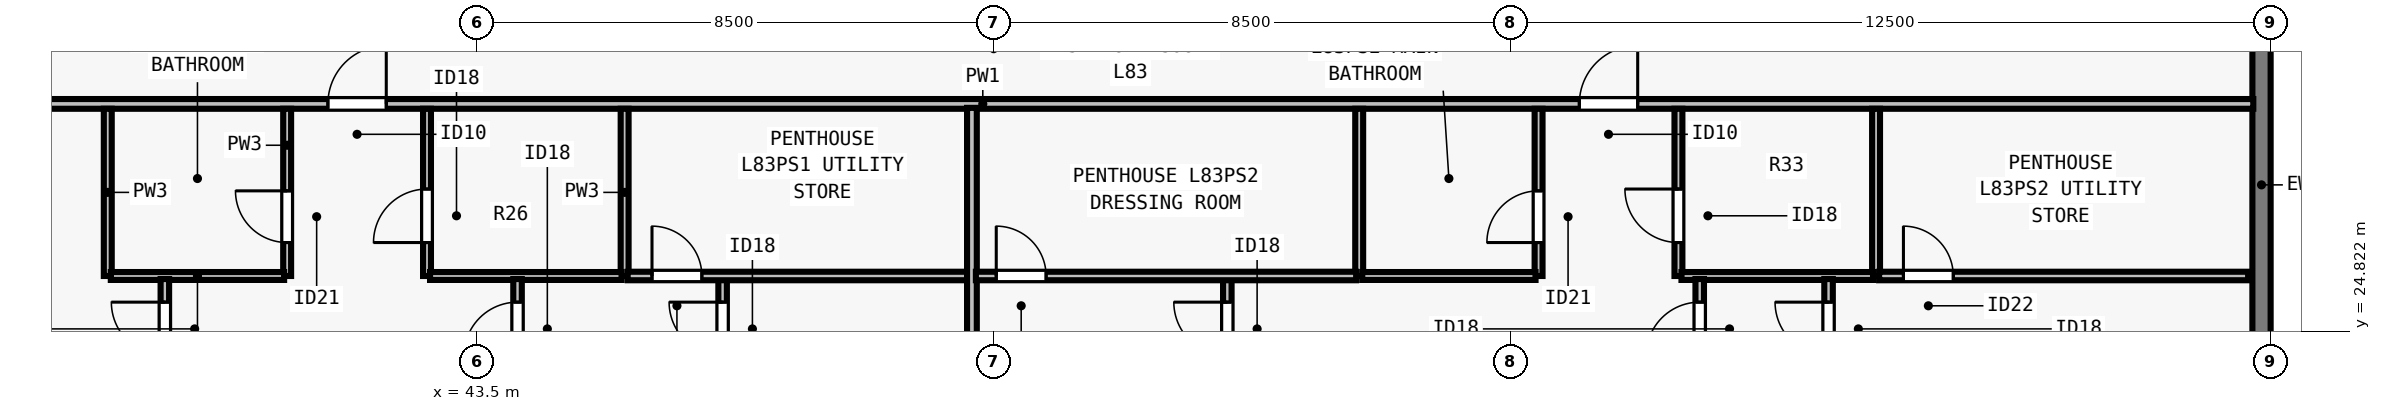
"""IFC4 building model, lengths in metres.
Left out: names, types, materials, properties, quantities, classifications, styles, units other than length and angle.
Written with IfcOpenShell. Run it as: python <this file> out.ifc"""

import sys

from ifc_helpers import new_model, si_unit, direction, frame, frame_2d, origin, place, context, subcontext, project, spatial, rectangle, extrude, element, fill, save


model = new_model("IFC4")
c1 = context("Model", 3, precision=1e-05, world=origin(), true_north=direction((0.0, 1.0)))
c2 = subcontext(c1, "Body", "Model", "MODEL_VIEW")
j1 = project(units=[si_unit("LENGTHUNIT", "METRE"), si_unit("PLANEANGLEUNIT", "RADIAN")], contexts=[c1])
p1 = place(None, origin())
s1 = spatial("IfcSite", under=j1, at=p1, CompositionType="ELEMENT")
p2 = place(p1, origin())
s2 = spatial("IfcBuilding", under=s1, at=p2, CompositionType="ELEMENT")
p3 = place(p2, frame((0.0, 0.0, 301.5)))
s3 = spatial("IfcBuildingStorey", under=s2, at=p3, CompositionType="ELEMENT", Elevation=301.5)
p4 = place(p3, frame((72.85, 34.8, 0.0), z_axis=(0.0, 0.0, 1.0), x_axis=(0.0, -1.0, 0.0)))
e1 = element("IfcWall", 1, at=p4, inside=s3, PredefinedType="SOLIDWALL", context=c2, shape_type="SweptSolid", body=[
    extrude(rectangle(XDim=11.022, YDim=0.3, at=frame_2d((5.511, 0.0))), origin(), (0.0, 0.0, 1.0), 3.29),
])
p5 = place(p4, frame((1.961, 0.0, 0.8)))
e2 = element("IfcOpeningElement", 2, at=p5, cuts=e1, PredefinedType="OPENING", context=c2, shape_type="SweptSolid", body=[
    extrude(rectangle(XDim=2.0, YDim=1.758, at=frame_2d((1.0, 0.879))), frame((0.0, 0.16, 0.0), z_axis=(0.0, -1.0, 0.0), x_axis=(1.0, 0.0, 0.0)), (0.0, 0.0, 1.0), 0.32),
])
p6 = place(p3, frame((31.285, 28.565, 0.0), z_axis=(0.0, 0.0, 1.0), x_axis=(1.0, 0.0, 0.0)))
e3 = element("IfcWall", 3, at=p6, inside=s3, PredefinedType="PARTITIONING", context=c2, shape_type="SweptSolid", body=[
    extrude(rectangle(XDim=41.43, YDim=0.16, at=frame_2d((20.715, 0.0))), origin(), (0.0, 0.0, 1.0), 3.009),
])
p7 = place(p6, frame((9.766, 0.0, 0.0)))
e4 = element("IfcOpeningElement", 4, at=p7, cuts=e3, PredefinedType="OPENING", context=c2, shape_type="SweptSolid", body=[
    extrude(rectangle(XDim=0.96, YDim=2.18, at=frame_2d((0.48, 1.09))), frame((0.0, 0.09, 0.0), z_axis=(0.0, -1.0, 0.0), x_axis=(1.0, 0.0, 0.0)), (0.0, 0.0, 1.0), 0.18),
])
p8 = place(p6, frame((30.346, 0.0, 0.0)))
e5 = element("IfcOpeningElement", 5, at=p8, cuts=e3, PredefinedType="OPENING", context=c2, shape_type="SweptSolid", body=[
    extrude(rectangle(XDim=0.96, YDim=2.18, at=frame_2d((0.48, 1.09))), frame((0.0, 0.09, 0.0), z_axis=(0.0, -1.0, 0.0), x_axis=(1.0, 0.0, 0.0)), (0.0, 0.0, 1.0), 0.18),
])
p9 = place(p3, frame((37.431, 25.735, 0.0), z_axis=(0.0, 0.0, 1.0), x_axis=(0.0, 1.0, 0.0)))
e6 = element("IfcWall", 6, at=p9, inside=s3, PredefinedType="PLUMBINGWALL", context=c2, shape_type="SweptSolid", body=[
    extrude(rectangle(XDim=2.75, YDim=0.13, at=frame_2d((1.375, 0.0))), origin(), (0.0, 0.0, 1.0), 3.29),
])
p10 = place(p3, frame((40.381, 25.735, 0.0), z_axis=(0.0, 0.0, 1.0), x_axis=(0.0, 1.0, 0.0)))
e7 = element("IfcWall", 7, at=p10, inside=s3, PredefinedType="PLUMBINGWALL", context=c2, shape_type="SweptSolid", body=[
    extrude(rectangle(XDim=2.75, YDim=0.13, at=frame_2d((1.375, 0.0))), origin(), (0.0, 0.0, 1.0), 3.29),
])
p11 = place(p10, frame((0.55, 0.0, 0.0)))
e8 = element("IfcOpeningElement", 8, at=p11, cuts=e7, PredefinedType="OPENING", context=c2, shape_type="SweptSolid", body=[
    extrude(rectangle(XDim=0.85, YDim=2.08, at=frame_2d((0.425, 1.04))), frame((0.0, 0.075, 0.0), z_axis=(0.0, -1.0, 0.0), x_axis=(1.0, 0.0, 0.0)), (0.0, 0.0, 1.0), 0.15),
])
p12 = place(p3, frame((37.481, 25.735, 0.0), z_axis=(0.0, 0.0, 1.0), x_axis=(1.0, 0.0, 0.0)))
e9 = element("IfcWall", 9, at=p12, inside=s3, PredefinedType="PLUMBINGWALL", context=c2, shape_type="SweptSolid", body=[
    extrude(rectangle(XDim=2.85, YDim=0.13, at=frame_2d((1.425, 0.0))), origin(), (0.0, 0.0, 1.0), 3.29),
])
p13 = place(p3, frame((45.931, 25.735, 0.0), z_axis=(0.0, 0.0, 1.0), x_axis=(0.0, 1.0, 0.0)))
e10 = element("IfcWall", 10, at=p13, inside=s3, PredefinedType="PLUMBINGWALL", context=c2, shape_type="SweptSolid", body=[
    extrude(rectangle(XDim=2.75, YDim=0.13, at=frame_2d((1.375, 0.0))), origin(), (0.0, 0.0, 1.0), 3.29),
])
p14 = place(p3, frame((42.681, 25.735, 0.0), z_axis=(0.0, 0.0, 1.0), x_axis=(0.0, 1.0, 0.0)))
e11 = element("IfcWall", 11, at=p14, inside=s3, PredefinedType="PLUMBINGWALL", context=c2, shape_type="SweptSolid", body=[
    extrude(rectangle(XDim=2.75, YDim=0.13, at=frame_2d((1.375, 0.0))), origin(), (0.0, 0.0, 1.0), 3.29),
])
p15 = place(p14, frame((0.55, 0.0, 0.0)))
e12 = element("IfcOpeningElement", 12, at=p15, cuts=e11, PredefinedType="OPENING", context=c2, shape_type="SweptSolid", body=[
    extrude(rectangle(XDim=0.88, YDim=2.1, at=frame_2d((0.44, 1.05))), frame((0.0, 0.075, 0.0), z_axis=(0.0, -1.0, 0.0), x_axis=(1.0, 0.0, 0.0)), (0.0, 0.0, 1.0), 0.15),
])
p16 = place(p3, frame((42.731, 25.735, 0.0), z_axis=(0.0, 0.0, 1.0), x_axis=(1.0, 0.0, 0.0)))
e13 = element("IfcWall", 13, at=p16, inside=s3, PredefinedType="PLUMBINGWALL", context=c2, shape_type="SweptSolid", body=[
    extrude(rectangle(XDim=3.15, YDim=0.13, at=frame_2d((1.575, 0.0))), origin(), (0.0, 0.0, 1.0), 3.29),
])
p17 = place(p3, frame((38.37, 18.38, 0.0), z_axis=(0.0, 0.0, 1.0), x_axis=(0.0, 1.0, 0.0)))
e14 = element("IfcWall", 14, at=p17, inside=s3, PredefinedType="PARTITIONING", context=c2, shape_type="SweptSolid", body=[
    extrude(rectangle(XDim=7.305, YDim=0.14, at=frame_2d((3.653, 0.0))), origin(), (0.0, 0.0, 1.0), 2.653),
])
p18 = place(p17, frame((6.045, 0.0, 0.0)))
e15 = element("IfcOpeningElement", 15, at=p18, cuts=e14, PredefinedType="OPENING", context=c2, shape_type="SweptSolid", body=[
    extrude(rectangle(XDim=0.88, YDim=2.1, at=frame_2d((0.44, 1.05))), frame((0.0, 0.08, 0.0), z_axis=(0.0, -1.0, 0.0), x_axis=(1.0, 0.0, 0.0)), (0.0, 0.0, 1.0), 0.16),
])
p19 = place(p3, frame((47.542, 18.38, 0.0), z_axis=(0.0, 0.0, 1.0), x_axis=(0.0, 1.0, 0.0)))
e16 = element("IfcWall", 16, at=p19, inside=s3, PredefinedType="PARTITIONING", context=c2, shape_type="SweptSolid", body=[
    extrude(rectangle(XDim=7.395, YDim=0.14, at=frame_2d((3.698, 0.0))), origin(), (0.0, 0.0, 1.0), 3.009),
])
p20 = place(p19, frame((6.045, 0.0, 0.0)))
e17 = element("IfcOpeningElement", 17, at=p20, cuts=e16, PredefinedType="OPENING", context=c2, shape_type="SweptSolid", body=[
    extrude(rectangle(XDim=0.88, YDim=2.1, at=frame_2d((0.44, 1.05))), frame((0.0, 0.08, 0.0), z_axis=(0.0, -1.0, 0.0), x_axis=(1.0, 0.0, 0.0)), (0.0, 0.0, 1.0), 0.16),
])
p21 = place(p3, frame((45.981, 25.735, 0.0), z_axis=(0.0, 0.0, 1.0), x_axis=(1.0, 0.0, 0.0)))
e18 = element("IfcWall", 18, at=p21, inside=s3, PredefinedType="PARTITIONING", context=c2, shape_type="SweptSolid", body=[
    extrude(rectangle(XDim=5.711, YDim=0.14, at=frame_2d((2.855, 0.0))), origin(), (0.0, 0.0, 1.0), 3.29),
])
p22 = place(p21, frame((0.4, 0.0, 0.0)))
e19 = element("IfcOpeningElement", 19, at=p22, cuts=e18, PredefinedType="OPENING", context=c2, shape_type="SweptSolid", body=[
    extrude(rectangle(XDim=0.82, YDim=2.1, at=frame_2d((0.41, 1.05))), frame((0.0, 0.08, 0.0), z_axis=(0.0, -1.0, 0.0), x_axis=(1.0, 0.0, 0.0)), (0.0, 0.0, 1.0), 0.16),
])
p23 = place(p3, frame((44.17, 18.38, 0.0), z_axis=(0.0, 0.0, 1.0), x_axis=(0.0, 1.0, 0.0)))
e20 = element("IfcWall", 20, at=p23, inside=s3, PredefinedType="PARTITIONING", context=c2, shape_type="SweptSolid", body=[
    extrude(rectangle(XDim=7.305, YDim=0.14, at=frame_2d((3.653, 0.0))), origin(), (0.0, 0.0, 1.0), 3.29),
])
p24 = place(p23, frame((6.045, 0.0, 0.0)))
e21 = element("IfcOpeningElement", 21, at=p24, cuts=e20, PredefinedType="OPENING", context=c2, shape_type="SweptSolid", body=[
    extrude(rectangle(XDim=0.88, YDim=2.1, at=frame_2d((0.44, 1.05))), frame((0.0, 0.08, 0.0), z_axis=(0.0, -1.0, 0.0), x_axis=(1.0, 0.0, 0.0)), (0.0, 0.0, 1.0), 0.16),
])
p25 = place(p3, frame((51.643, 18.285, 0.0), z_axis=(0.0, 0.0, 1.0), x_axis=(0.0, 1.0, 0.0)))
e22 = element("IfcWall", 22, at=p25, inside=s3, PredefinedType="PARTITIONING", context=c2, shape_type="SweptSolid", body=[
    extrude(rectangle(XDim=10.215, YDim=0.16, at=frame_2d((5.107, 0.0))), origin(), (0.0, 0.0, 1.0), 3.009),
])
p26 = place(p3, frame((58.011, 25.735, 0.0), z_axis=(0.0, 0.0, 1.0), x_axis=(0.0, 1.0, 0.0)))
e23 = element("IfcWall", 23, at=p26, inside=s3, PredefinedType="PLUMBINGWALL", context=c2, shape_type="SweptSolid", body=[
    extrude(rectangle(XDim=2.75, YDim=0.13, at=frame_2d((1.375, 0.0))), origin(), (0.0, 0.0, 1.0), 3.29),
])
p27 = place(p3, frame((60.961, 25.735, 0.0), z_axis=(0.0, 0.0, 1.0), x_axis=(0.0, 1.0, 0.0)))
e24 = element("IfcWall", 24, at=p27, inside=s3, PredefinedType="PLUMBINGWALL", context=c2, shape_type="SweptSolid", body=[
    extrude(rectangle(XDim=2.75, YDim=0.13, at=frame_2d((1.375, 0.0))), origin(), (0.0, 0.0, 1.0), 3.29),
])
p28 = place(p27, frame((0.55, 0.0, 0.0)))
e25 = element("IfcOpeningElement", 25, at=p28, cuts=e24, PredefinedType="OPENING", context=c2, shape_type="SweptSolid", body=[
    extrude(rectangle(XDim=0.85, YDim=2.08, at=frame_2d((0.425, 1.04))), frame((0.0, 0.075, 0.0), z_axis=(0.0, -1.0, 0.0), x_axis=(1.0, 0.0, 0.0)), (0.0, 0.0, 1.0), 0.15),
])
p29 = place(p3, frame((58.061, 25.735, 0.0), z_axis=(0.0, 0.0, 1.0), x_axis=(1.0, 0.0, 0.0)))
e26 = element("IfcWall", 26, at=p29, inside=s3, PredefinedType="PLUMBINGWALL", context=c2, shape_type="SweptSolid", body=[
    extrude(rectangle(XDim=2.85, YDim=0.13, at=frame_2d((1.425, 0.0))), origin(), (0.0, 0.0, 1.0), 3.29),
])
p30 = place(p3, frame((66.511, 25.735, 0.0), z_axis=(0.0, 0.0, 1.0), x_axis=(0.0, 1.0, 0.0)))
e27 = element("IfcWall", 27, at=p30, inside=s3, PredefinedType="PLUMBINGWALL", context=c2, shape_type="SweptSolid", body=[
    extrude(rectangle(XDim=2.75, YDim=0.13, at=frame_2d((1.375, 0.0))), origin(), (0.0, 0.0, 1.0), 3.29),
])
p31 = place(p3, frame((63.261, 25.735, 0.0), z_axis=(0.0, 0.0, 1.0), x_axis=(0.0, 1.0, 0.0)))
e28 = element("IfcWall", 28, at=p31, inside=s3, PredefinedType="PLUMBINGWALL", context=c2, shape_type="SweptSolid", body=[
    extrude(rectangle(XDim=2.75, YDim=0.13, at=frame_2d((1.375, 0.0))), origin(), (0.0, 0.0, 1.0), 3.29),
])
p32 = place(p31, frame((0.55, 0.0, 0.0)))
e29 = element("IfcOpeningElement", 29, at=p32, cuts=e28, PredefinedType="OPENING", context=c2, shape_type="SweptSolid", body=[
    extrude(rectangle(XDim=0.88, YDim=2.1, at=frame_2d((0.44, 1.05))), frame((0.0, 0.075, 0.0), z_axis=(0.0, -1.0, 0.0), x_axis=(1.0, 0.0, 0.0)), (0.0, 0.0, 1.0), 0.15),
])
p33 = place(p3, frame((63.311, 25.735, 0.0), z_axis=(0.0, 0.0, 1.0), x_axis=(1.0, 0.0, 0.0)))
e30 = element("IfcWall", 30, at=p33, inside=s3, PredefinedType="PLUMBINGWALL", context=c2, shape_type="SweptSolid", body=[
    extrude(rectangle(XDim=3.15, YDim=0.13, at=frame_2d((1.575, 0.0))), origin(), (0.0, 0.0, 1.0), 3.29),
])
p34 = place(p3, frame((55.843, 18.38, 0.0), z_axis=(0.0, 0.0, 1.0), x_axis=(0.0, 1.0, 0.0)))
e31 = element("IfcWall", 31, at=p34, inside=s3, PredefinedType="PARTITIONING", context=c2, shape_type="SweptSolid", body=[
    extrude(rectangle(XDim=7.395, YDim=0.14, at=frame_2d((3.698, 0.0))), origin(), (0.0, 0.0, 1.0), 3.29),
])
p35 = place(p34, frame((6.045, 0.0, 0.0)))
e32 = element("IfcOpeningElement", 32, at=p35, cuts=e31, PredefinedType="OPENING", context=c2, shape_type="SweptSolid", body=[
    extrude(rectangle(XDim=0.88, YDim=2.1, at=frame_2d((0.44, 1.05))), frame((0.0, 0.08, 0.0), z_axis=(0.0, -1.0, 0.0), x_axis=(1.0, 0.0, 0.0)), (0.0, 0.0, 1.0), 0.16),
])
p36 = place(p3, frame((51.708, 25.735, 0.0), z_axis=(0.0, 0.0, 1.0), x_axis=(1.0, 0.0, 0.0)))
e33 = element("IfcWall", 33, at=p36, inside=s3, PredefinedType="PARTITIONING", context=c2, shape_type="SweptSolid", body=[
    extrude(rectangle(XDim=6.254, YDim=0.14, at=frame_2d((3.127, 0.0))), origin(), (0.0, 0.0, 1.0), 3.29),
])
p37 = place(p36, frame((0.335, 0.0, 0.0)))
e34 = element("IfcOpeningElement", 34, at=p37, cuts=e33, PredefinedType="OPENING", context=c2, shape_type="SweptSolid", body=[
    extrude(rectangle(XDim=0.82, YDim=2.1, at=frame_2d((0.41, 1.05))), frame((0.0, 0.08, 0.0), z_axis=(0.0, -1.0, 0.0), x_axis=(1.0, 0.0, 0.0)), (0.0, 0.0, 1.0), 0.16),
])
p38 = place(p3, frame((65.73, 18.38, 0.0), z_axis=(0.0, 0.0, 1.0), x_axis=(0.0, 1.0, 0.0)))
e35 = element("IfcWall", 35, at=p38, inside=s3, PredefinedType="PARTITIONING", context=c2, shape_type="SweptSolid", body=[
    extrude(rectangle(XDim=7.305, YDim=0.14, at=frame_2d((3.653, 0.0))), origin(), (0.0, 0.0, 1.0), 2.653),
])
p39 = place(p38, frame((6.045, 0.0, 0.0)))
e36 = element("IfcOpeningElement", 36, at=p39, cuts=e35, PredefinedType="OPENING", context=c2, shape_type="SweptSolid", body=[
    extrude(rectangle(XDim=0.88, YDim=2.1, at=frame_2d((0.44, 1.05))), frame((0.0, 0.08, 0.0), z_axis=(0.0, -1.0, 0.0), x_axis=(1.0, 0.0, 0.0)), (0.0, 0.0, 1.0), 0.16),
])
p40 = place(p3, frame((66.561, 25.735, 0.0), z_axis=(0.0, 0.0, 1.0), x_axis=(1.0, 0.0, 0.0)))
e37 = element("IfcWall", 37, at=p40, inside=s3, PredefinedType="PARTITIONING", context=c2, shape_type="SweptSolid", body=[
    extrude(rectangle(XDim=6.069, YDim=0.14, at=frame_2d((3.034, 0.0))), origin(), (0.0, 0.0, 1.0), 3.009),
])
p41 = place(p40, frame((0.4, 0.0, 0.0)))
e38 = element("IfcOpeningElement", 38, at=p41, cuts=e37, PredefinedType="OPENING", context=c2, shape_type="SweptSolid", body=[
    extrude(rectangle(XDim=0.82, YDim=2.1, at=frame_2d((0.41, 1.05))), frame((0.0, 0.08, 0.0), z_axis=(0.0, -1.0, 0.0), x_axis=(1.0, 0.0, 0.0)), (0.0, 0.0, 1.0), 0.16),
])
p42 = place(p3, frame((63.611, 18.38, 0.0), z_axis=(0.0, 0.0, 1.0), x_axis=(0.0, 1.0, 0.0)))
e39 = element("IfcWall", 39, at=p42, inside=s3, PredefinedType="PARTITIONING", context=c2, shape_type="SweptSolid", body=[
    extrude(rectangle(XDim=7.305, YDim=0.14, at=frame_2d((3.653, 0.0))), origin(), (0.0, 0.0, 1.0), 2.653),
])
p43 = place(p42, frame((6.045, 0.0, 0.0)))
e40 = element("IfcOpeningElement", 40, at=p43, cuts=e39, PredefinedType="OPENING", context=c2, shape_type="SweptSolid", body=[
    extrude(rectangle(XDim=0.88, YDim=2.1, at=frame_2d((0.44, 1.05))), frame((0.0, 0.08, 0.0), z_axis=(0.0, -1.0, 0.0), x_axis=(1.0, 0.0, 0.0)), (0.0, 0.0, 1.0), 0.16),
])
p44 = place(p11, origin())
e41 = element("IfcDoor", 41, at=p44, inside=s3, OperationType="SINGLE_SWING_RIGHT", PredefinedType="DOOR", context=c2, shape_type="SweptSolid", body=[
    extrude(rectangle(XDim=0.85, YDim=2.08, at=frame_2d((0.425, 1.04))), frame((0.0, 0.025, 0.0), z_axis=(0.0, -1.0, 0.0), x_axis=(1.0, 0.0, 0.0)), (0.0, 0.0, 1.0), 0.05),
])
fill(e8, e41)
p45 = place(p15, origin())
e42 = element("IfcDoor", 42, at=p45, inside=s3, OperationType="SINGLE_SWING_LEFT", PredefinedType="DOOR", context=c2, shape_type="SweptSolid", body=[
    extrude(rectangle(XDim=0.88, YDim=2.1, at=frame_2d((0.44, 1.05))), frame((0.0, 0.025, 0.0), z_axis=(0.0, -1.0, 0.0), x_axis=(1.0, 0.0, 0.0)), (0.0, 0.0, 1.0), 0.05),
])
fill(e12, e42)
p46 = place(p18, origin())
e43 = element("IfcDoor", 43, at=p46, inside=s3, OperationType="SINGLE_SWING_RIGHT", PredefinedType="DOOR", context=c2, shape_type="SweptSolid", body=[
    extrude(rectangle(XDim=0.88, YDim=2.1, at=frame_2d((0.44, 1.05))), frame((0.0, 0.025, 0.0), z_axis=(0.0, -1.0, 0.0), x_axis=(1.0, 0.0, 0.0)), (0.0, 0.0, 1.0), 0.05),
])
fill(e15, e43)
p47 = place(p22, origin())
e44 = element("IfcDoor", 44, at=p47, inside=s3, OperationType="SINGLE_SWING_LEFT", PredefinedType="DOOR", context=c2, shape_type="SweptSolid", body=[
    extrude(rectangle(XDim=0.82, YDim=2.1, at=frame_2d((0.41, 1.05))), frame((0.0, 0.025, 0.0), z_axis=(0.0, -1.0, 0.0), x_axis=(1.0, 0.0, 0.0)), (0.0, 0.0, 1.0), 0.05),
])
fill(e19, e44)
p48 = place(p20, origin())
e45 = element("IfcDoor", 45, at=p48, inside=s3, OperationType="SINGLE_SWING_RIGHT", PredefinedType="DOOR", context=c2, shape_type="SweptSolid", body=[
    extrude(rectangle(XDim=0.88, YDim=2.1, at=frame_2d((0.44, 1.05))), frame((0.0, 0.025, 0.0), z_axis=(0.0, -1.0, 0.0), x_axis=(1.0, 0.0, 0.0)), (0.0, 0.0, 1.0), 0.05),
])
fill(e17, e45)
p49 = place(p24, origin())
e46 = element("IfcDoor", 46, at=p49, inside=s3, OperationType="SINGLE_SWING_LEFT", PredefinedType="DOOR", context=c2, shape_type="SweptSolid", body=[
    extrude(rectangle(XDim=0.88, YDim=2.1, at=frame_2d((0.44, 1.05))), frame((0.0, 0.025, 0.0), z_axis=(0.0, -1.0, 0.0), x_axis=(1.0, 0.0, 0.0)), (0.0, 0.0, 1.0), 0.05),
])
fill(e21, e46)
p50 = place(p7, origin())
e47 = element("IfcDoor", 47, at=p50, inside=s3, OperationType="SINGLE_SWING_RIGHT", PredefinedType="DOOR", context=c2, shape_type="SweptSolid", body=[
    extrude(rectangle(XDim=0.96, YDim=2.18, at=frame_2d((0.48, 1.09))), frame((0.0, 0.025, 0.0), z_axis=(0.0, -1.0, 0.0), x_axis=(1.0, 0.0, 0.0)), (0.0, 0.0, 1.0), 0.05),
])
fill(e4, e47)
p51 = place(p28, origin())
e48 = element("IfcDoor", 48, at=p51, inside=s3, OperationType="SINGLE_SWING_LEFT", PredefinedType="DOOR", context=c2, shape_type="SweptSolid", body=[
    extrude(rectangle(XDim=0.85, YDim=2.08, at=frame_2d((0.425, 1.04))), frame((0.0, 0.025, 0.0), z_axis=(0.0, -1.0, 0.0), x_axis=(1.0, 0.0, 0.0)), (0.0, 0.0, 1.0), 0.05),
])
fill(e25, e48)
p52 = place(p32, origin())
e49 = element("IfcDoor", 49, at=p52, inside=s3, OperationType="SINGLE_SWING_RIGHT", PredefinedType="DOOR", context=c2, shape_type="SweptSolid", body=[
    extrude(rectangle(XDim=0.88, YDim=2.1, at=frame_2d((0.44, 1.05))), frame((0.0, 0.025, 0.0), z_axis=(0.0, -1.0, 0.0), x_axis=(1.0, 0.0, 0.0)), (0.0, 0.0, 1.0), 0.05),
])
fill(e29, e49)
p53 = place(p37, origin())
e50 = element("IfcDoor", 50, at=p53, inside=s3, OperationType="SINGLE_SWING_LEFT", PredefinedType="DOOR", context=c2, shape_type="SweptSolid", body=[
    extrude(rectangle(XDim=0.82, YDim=2.1, at=frame_2d((0.41, 1.05))), frame((0.0, 0.025, 0.0), z_axis=(0.0, -1.0, 0.0), x_axis=(1.0, 0.0, 0.0)), (0.0, 0.0, 1.0), 0.05),
])
fill(e34, e50)
p54 = place(p35, origin())
e51 = element("IfcDoor", 51, at=p54, inside=s3, OperationType="SINGLE_SWING_RIGHT", PredefinedType="DOOR", context=c2, shape_type="SweptSolid", body=[
    extrude(rectangle(XDim=0.88, YDim=2.1, at=frame_2d((0.44, 1.05))), frame((0.0, 0.025, 0.0), z_axis=(0.0, -1.0, 0.0), x_axis=(1.0, 0.0, 0.0)), (0.0, 0.0, 1.0), 0.05),
])
fill(e32, e51)
p55 = place(p41, origin())
e52 = element("IfcDoor", 52, at=p55, inside=s3, OperationType="SINGLE_SWING_LEFT", PredefinedType="DOOR", context=c2, shape_type="SweptSolid", body=[
    extrude(rectangle(XDim=0.82, YDim=2.1, at=frame_2d((0.41, 1.05))), frame((0.0, 0.025, 0.0), z_axis=(0.0, -1.0, 0.0), x_axis=(1.0, 0.0, 0.0)), (0.0, 0.0, 1.0), 0.05),
])
fill(e38, e52)
p56 = place(p39, origin())
e53 = element("IfcDoor", 53, at=p56, inside=s3, OperationType="SINGLE_SWING_RIGHT", PredefinedType="DOOR", context=c2, shape_type="SweptSolid", body=[
    extrude(rectangle(XDim=0.88, YDim=2.1, at=frame_2d((0.44, 1.05))), frame((0.0, 0.025, 0.0), z_axis=(0.0, -1.0, 0.0), x_axis=(1.0, 0.0, 0.0)), (0.0, 0.0, 1.0), 0.05),
])
fill(e36, e53)
p57 = place(p43, origin())
e54 = element("IfcDoor", 54, at=p57, inside=s3, OperationType="SINGLE_SWING_LEFT", PredefinedType="DOOR", context=c2, shape_type="SweptSolid", body=[
    extrude(rectangle(XDim=0.88, YDim=2.1, at=frame_2d((0.44, 1.05))), frame((0.0, 0.025, 0.0), z_axis=(0.0, -1.0, 0.0), x_axis=(1.0, 0.0, 0.0)), (0.0, 0.0, 1.0), 0.05),
])
fill(e40, e54)
p58 = place(p8, origin())
e55 = element("IfcDoor", 55, at=p58, inside=s3, OperationType="SINGLE_SWING_RIGHT", PredefinedType="DOOR", context=c2, shape_type="SweptSolid", body=[
    extrude(rectangle(XDim=0.96, YDim=2.18, at=frame_2d((0.48, 1.09))), frame((0.0, 0.025, 0.0), z_axis=(0.0, -1.0, 0.0), x_axis=(1.0, 0.0, 0.0)), (0.0, 0.0, 1.0), 0.05),
])
fill(e5, e55)
save(model, sys.argv[1])
